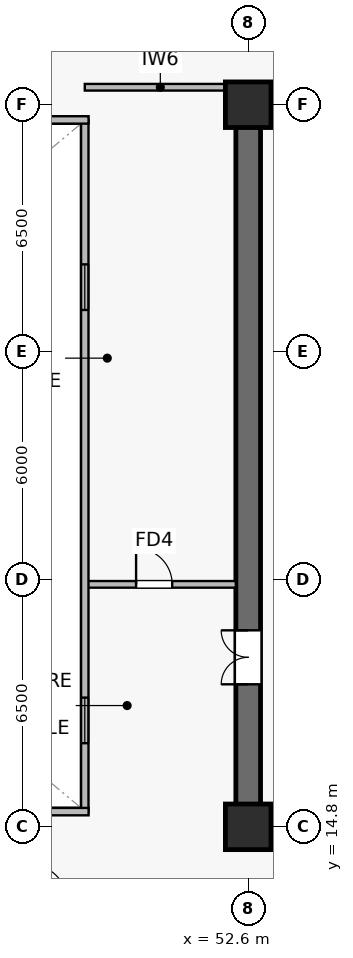
"""IFC4 building model, lengths in metres.
Left out: names, types, materials, properties, quantities, classifications, styles, units other than length and angle.
Written with IfcOpenShell. Run it as: python <this file> out.ifc"""

import sys

from ifc_helpers import new_model, si_unit, direction, frame, frame_2d, origin, origin_2d, place, context, subcontext, project, spatial, rectangle, extrude, source, transform, mapped, element, fill, save


model = new_model("IFC4")
c1 = context("Model", 3, precision=1e-05, world=origin(), true_north=direction((0.0, 1.0)))
c2 = subcontext(c1, "Body", "Model", "MODEL_VIEW")
j1 = project(units=[si_unit("LENGTHUNIT", "METRE"), si_unit("PLANEANGLEUNIT", "RADIAN")], contexts=[c1])
p1 = place(None, origin())
s1 = spatial("IfcSite", under=j1, at=p1, CompositionType="ELEMENT")
p2 = place(p1, origin())
s2 = spatial("IfcBuilding", under=s1, at=p2, CompositionType="ELEMENT")
p3 = place(p2, frame((0.0, 0.0, 187.1)))
s3 = spatial("IfcBuildingStorey", under=s2, at=p3, CompositionType="ELEMENT", Elevation=187.1)
p4 = place(p3, frame((52.275, 14.8, 0.0), z_axis=(0.0, 0.0, 1.0), x_axis=(1.0, 0.0, 0.0)))
e1 = element("IfcWall", 1, at=p4, inside=s3, PredefinedType="SHEAR", context=c2, shape_type="SweptSolid", body=[
    extrude(rectangle(XDim=15.45, YDim=0.65, at=frame_2d((7.725, 0.0))), origin(), (0.0, 0.0, 1.0), 3.79),
])
p5 = place(p3, frame((52.275, 33.8, 0.0), z_axis=(0.0, 0.0, 1.0), x_axis=(1.0, 0.0, 0.0)))
e2 = element("IfcWall", 2, at=p5, inside=s3, PredefinedType="SHEAR", context=c2, shape_type="SweptSolid", body=[
    extrude(rectangle(XDim=15.45, YDim=0.65, at=frame_2d((7.725, 0.0))), origin(), (0.0, 0.0, 1.0), 3.79),
])
p6 = place(p5, frame((9.25, 0.0, 0.0)))
e3 = element("IfcOpeningElement", 3, at=p6, cuts=e2, PredefinedType="OPENING", context=c2, shape_type="SweptSolid", body=[
    extrude(rectangle(XDim=0.95, YDim=2.15, at=frame_2d((0.475, 1.075))), frame((0.0, 0.335, 0.0), z_axis=(0.0, -1.0, 0.0), x_axis=(1.0, 0.0, 0.0)), (0.0, 0.0, 1.0), 0.67),
])
p7 = place(p5, frame((6.735, 0.0, 0.0)))
e4 = element("IfcOpeningElement", 4, at=p7, cuts=e2, PredefinedType="OPENING", context=c2, shape_type="SweptSolid", body=[
    extrude(rectangle(XDim=0.95, YDim=2.15, at=frame_2d((0.475, 1.075))), frame((0.0, 0.335, 0.0), z_axis=(0.0, -1.0, 0.0), x_axis=(1.0, 0.0, 0.0)), (0.0, 0.0, 1.0), 0.67),
])
p8 = place(p5, frame((4.185, 0.0, 0.0)))
e5 = element("IfcOpeningElement", 5, at=p8, cuts=e2, PredefinedType="OPENING", context=c2, shape_type="SweptSolid", body=[
    extrude(rectangle(XDim=0.95, YDim=2.15, at=frame_2d((0.475, 1.075))), frame((0.0, 0.335, 0.0), z_axis=(0.0, -1.0, 0.0), x_axis=(1.0, 0.0, 0.0)), (0.0, 0.0, 1.0), 0.67),
])
p9 = place(p5, frame((1.635, 0.0, 0.0)))
e6 = element("IfcOpeningElement", 6, at=p9, cuts=e2, PredefinedType="OPENING", context=c2, shape_type="SweptSolid", body=[
    extrude(rectangle(XDim=0.95, YDim=2.15, at=frame_2d((0.475, 1.075))), frame((0.0, 0.335, 0.0), z_axis=(0.0, -1.0, 0.0), x_axis=(1.0, 0.0, 0.0)), (0.0, 0.0, 1.0), 0.67),
])
p10 = place(p3, frame((52.6, 15.125, 0.0), z_axis=(0.0, 0.0, 1.0), x_axis=(0.0, 1.0, 0.0)))
e7 = element("IfcWall", 7, at=p10, inside=s3, PredefinedType="SHEAR", context=c2, shape_type="SweptSolid", body=[
    extrude(rectangle(XDim=18.35, YDim=0.65, at=frame_2d((9.175, 0.0))), origin(), (0.0, 0.0, 1.0), 3.79),
])
p11 = place(p10, frame((3.425, 0.0, 0.0)))
e8 = element("IfcOpeningElement", 8, at=p11, cuts=e7, PredefinedType="OPENING", context=c2, shape_type="SweptSolid", body=[
    extrude(rectangle(XDim=1.42, YDim=2.2, at=frame_2d((0.71, 1.1))), frame((0.0, 0.335, 0.0), z_axis=(0.0, -1.0, 0.0), x_axis=(1.0, 0.0, 0.0)), (0.0, 0.0, 1.0), 0.67),
])
m1 = source(origin(), c2, "Body", "SweptSolid", [
    extrude(rectangle(XDim=1.2, YDim=1.2, at=origin_2d()), origin(), (0.0, 0.0, 1.0), 4.1),
])
for number, where, z_axis, x_axis in (
    (9, (52.6, 14.8, 0.0), (0.0, 0.0, 1.0), (1.0, 0.0, 0.0)),
    (10, (52.6, 33.8, 0.0), (0.0, 0.0, 1.0), (1.0, 0.0, 0.0)),
):
    element("IfcColumn", number, at=place(p3, frame(where, z_axis=z_axis, x_axis=x_axis)), inside=s3, PredefinedType="COLUMN", context=c2, shape_type="MappedRepresentation", body=[
        mapped(m1, transform((0.0, 0.0, 0.0), scale=1.0)),
    ])
p12 = place(p3, frame((48.3, 34.26, 0.0), z_axis=(0.0, 0.0, 1.0), x_axis=(1.0, 0.0, 0.0)))
e11 = element("IfcWall", 11, at=p12, inside=s3, PredefinedType="PARTITIONING", context=c2, shape_type="SweptSolid", body=[
    extrude(rectangle(XDim=3.975, YDim=0.175, at=frame_2d((1.987, 0.0))), origin(), (0.0, 0.0, 1.0), 3.475),
])
p13 = place(p3, frame((48.3, 21.18, 0.0), z_axis=(0.0, 0.0, 1.0), x_axis=(1.0, 0.0, 0.0)))
e12 = element("IfcWall", 12, at=p13, inside=s3, PredefinedType="PARTITIONING", context=c2, shape_type="SweptSolid", body=[
    extrude(rectangle(XDim=3.975, YDim=0.175, at=frame_2d((1.987, 0.0))), origin(), (0.0, 0.0, 1.0), 3.79),
])
p14 = place(p13, frame((1.35, 0.0, 0.0)))
e13 = element("IfcOpeningElement", 13, at=p14, cuts=e12, PredefinedType="OPENING", context=c2, shape_type="SweptSolid", body=[
    extrude(rectangle(XDim=0.95, YDim=2.15, at=frame_2d((0.475, 1.075))), frame((0.0, 0.098, 0.0), z_axis=(0.0, -1.0, 0.0), x_axis=(1.0, 0.0, 0.0)), (0.0, 0.0, 1.0), 0.195),
])
p15 = place(p3, frame((48.3, 15.2, 0.0), z_axis=(0.0, 0.0, 1.0), x_axis=(0.0, 1.0, 0.0)))
e14 = element("IfcWall", 14, at=p15, inside=s3, PredefinedType="SOLIDWALL", context=c2, shape_type="SweptSolid", body=[
    extrude(rectangle(XDim=18.2, YDim=0.195, at=frame_2d((9.1, 0.0))), origin(), (0.0, 0.0, 1.0), 3.79),
])
p16 = place(p15, frame((1.8, 0.0, 0.9)))
e15 = element("IfcOpeningElement", 15, at=p16, cuts=e14, PredefinedType="OPENING", context=c2, shape_type="SweptSolid", body=[
    extrude(rectangle(XDim=1.2, YDim=1.35, at=frame_2d((0.6, 0.675))), frame((0.0, 0.107, 0.0), z_axis=(0.0, -1.0, 0.0), x_axis=(1.0, 0.0, 0.0)), (0.0, 0.0, 1.0), 0.215),
])
p17 = place(p15, frame((13.2, 0.0, 0.9)))
e16 = element("IfcOpeningElement", 16, at=p17, cuts=e14, PredefinedType="OPENING", context=c2, shape_type="SweptSolid", body=[
    extrude(rectangle(XDim=1.2, YDim=1.35, at=frame_2d((0.6, 0.675))), frame((0.0, 0.107, 0.0), z_axis=(0.0, -1.0, 0.0), x_axis=(1.0, 0.0, 0.0)), (0.0, 0.0, 1.0), 0.215),
])
for number, where, z_axis, x_axis in (
    (17, (26.4, 15.2, 0.0), (0.0, 0.0, 1.0), (1.0, 0.0, 0.0)),
    (18, (26.4, 33.4, 0.0), (0.0, 0.0, 1.0), (1.0, 0.0, 0.0)),
):
    element("IfcWall", number, at=place(p3, frame(where, z_axis=z_axis, x_axis=x_axis)), inside=s3, PredefinedType="SOLIDWALL", context=c2, shape_type="SweptSolid", body=[
        extrude(rectangle(XDim=22.0, YDim=0.195, at=frame_2d((11.0, 0.0))), origin(), (0.0, 0.0, 1.0), 3.79),
    ])
m2 = source(origin(), c2, "Body", "SweptSolid", [
    extrude(rectangle(XDim=1.2, YDim=1.35, at=frame_2d((0.6, 0.675))), frame((0.0, 0.03, 0.0), z_axis=(0.0, -1.0, 0.0), x_axis=(1.0, 0.0, 0.0)), (0.0, 0.0, 1.0), 0.06),
])
p18 = place(p16, origin())
e19 = element("IfcWindow", 19, at=p18, inside=s3, PartitioningType="SINGLE_PANEL", PredefinedType="WINDOW", context=c2, shape_type="MappedRepresentation", body=[
    mapped(m2, transform((0.0, 0.0, 0.0), scale=1.0)),
])
fill(e15, e19)
p19 = place(p17, origin())
e20 = element("IfcWindow", 20, at=p19, inside=s3, PartitioningType="SINGLE_PANEL", PredefinedType="WINDOW", context=c2, shape_type="MappedRepresentation", body=[
    mapped(m2, transform((0.0, 0.0, 0.0), scale=1.0)),
])
fill(e16, e20)
m3 = source(origin(), c2, "Body", "SweptSolid", [
    extrude(rectangle(XDim=1.42, YDim=2.2, at=frame_2d((0.71, 1.1))), frame((0.0, 0.025, 0.0), z_axis=(0.0, -1.0, 0.0), x_axis=(1.0, 0.0, 0.0)), (0.0, 0.0, 1.0), 0.05),
])
p20 = place(p11, origin())
e21 = element("IfcDoor", 21, at=p20, inside=s3, OperationType="DOUBLE_DOOR_SINGLE_SWING", PredefinedType="DOOR", context=c2, shape_type="MappedRepresentation", body=[
    mapped(m3, transform((0.0, 0.0, 0.0), scale=1.0)),
])
fill(e8, e21)
m4 = source(origin(), c2, "Body", "SweptSolid", [
    extrude(rectangle(XDim=0.95, YDim=2.15, at=frame_2d((0.475, 1.075))), frame((0.0, 0.025, 0.0), z_axis=(0.0, -1.0, 0.0), x_axis=(1.0, 0.0, 0.0)), (0.0, 0.0, 1.0), 0.05),
])
p21 = place(p14, origin())
e22 = element("IfcDoor", 22, at=p21, inside=s3, OperationType="SINGLE_SWING_LEFT", PredefinedType="DOOR", context=c2, shape_type="MappedRepresentation", body=[
    mapped(m4, transform((0.0, 0.0, 0.0), scale=1.0)),
])
fill(e13, e22)
save(model, sys.argv[1])
